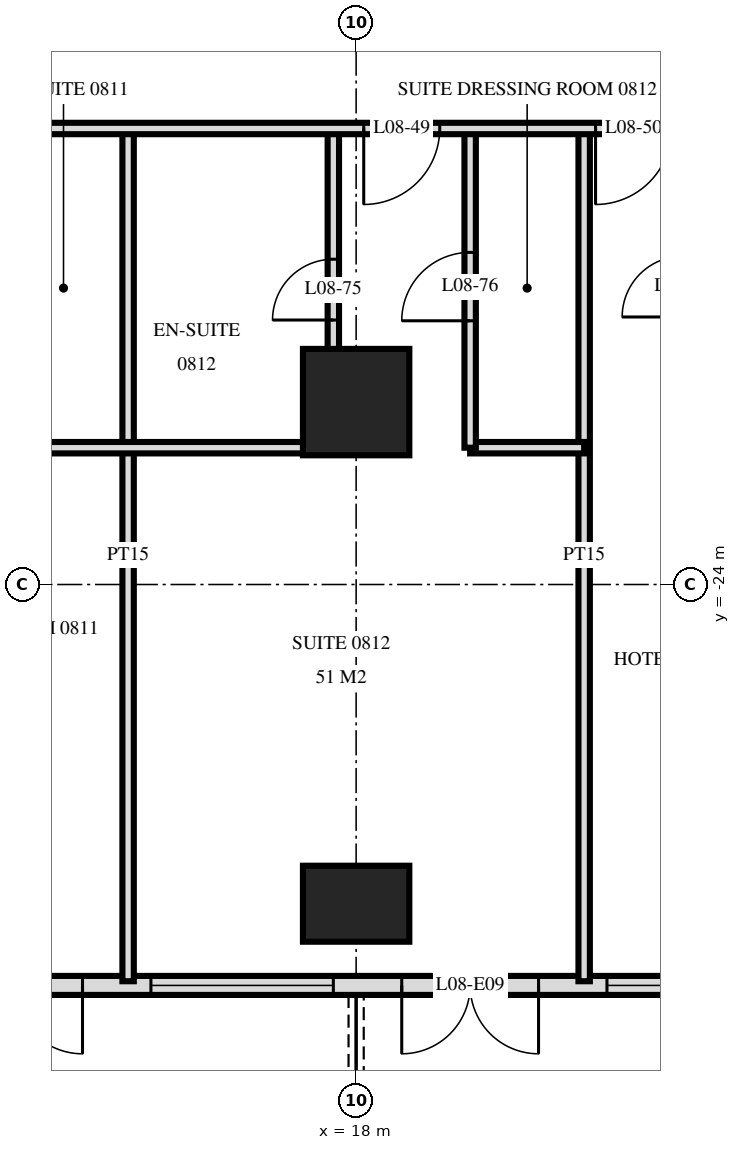
"""IFC4 building model, lengths in metres.
Left out: names, types, materials, properties, quantities, classifications, styles, units other than length and angle.
Written with IfcOpenShell. Run it as: python <this file> out.ifc"""

import sys

from ifc_helpers import new_model, si_unit, direction, frame, frame_2d, origin, origin_2d, place, context, subcontext, project, spatial, rectangle, extrude, element, fill, save


model = new_model("IFC4")
c1 = context("Model", 3, precision=1e-05, world=origin(), true_north=direction((0.0, 1.0)))
c2 = subcontext(c1, "Body", "Model", "MODEL_VIEW")
j1 = project(units=[si_unit("LENGTHUNIT", "METRE"), si_unit("PLANEANGLEUNIT", "RADIAN")], contexts=[c1])
p1 = place(None, origin())
s1 = spatial("IfcSite", under=j1, at=p1, CompositionType="ELEMENT")
p2 = place(p1, origin())
s2 = spatial("IfcBuilding", under=s1, at=p2, CompositionType="ELEMENT")
p3 = place(p2, frame((0.0, 0.0, 38.4)))
s3 = spatial("IfcBuildingStorey", under=s2, at=p3, CompositionType="ELEMENT", Elevation=38.4)
p4 = place(p3, frame((18.0, -28.2, 0.0), z_axis=(0.0, 0.0, 1.0), x_axis=(1.0, 0.0, 0.0)))
e1 = element("IfcColumn", 1, at=p4, inside=s3, PredefinedType="COLUMN", context=c2, shape_type="SweptSolid", body=[
    extrude(rectangle(XDim=1.4, YDim=1.0, at=origin_2d()), origin(), (0.0, 0.0, 1.0), 3.6),
])
p5 = place(p3, frame((18.0, -21.6, 0.0), z_axis=(0.0, 0.0, 1.0), x_axis=(1.0, 0.0, 0.0)))
e2 = element("IfcColumn", 2, at=p5, inside=s3, PredefinedType="COLUMN", context=c2, shape_type="SweptSolid", body=[
    extrude(rectangle(XDim=1.4, YDim=1.4, at=origin_2d()), origin(), (0.0, 0.0, 1.0), 3.6),
])
p6 = place(p3, frame((-28.775, -29.275, 0.0), z_axis=(0.0, 0.0, 1.0), x_axis=(1.0, 0.0, 0.0)))
e3 = element("IfcWall", 3, at=p6, inside=s3, PredefinedType="SOLIDWALL", context=c2, shape_type="SweptSolid", body=[
    extrude(rectangle(XDim=57.551, YDim=0.25, at=frame_2d((28.775, 0.0))), origin(), (0.0, 0.0, 1.0), 3.32),
])
p7 = place(p6, frame((0.575, 0.0, 0.0)))
e4 = element("IfcOpeningElement", 4, at=p7, cuts=e3, PredefinedType="OPENING", context=c2, shape_type="SweptSolid", body=[
    extrude(rectangle(XDim=1.8, YDim=2.4, at=frame_2d((0.9, 1.2))), frame((0.0, 0.135, 0.0), z_axis=(0.0, -1.0, 0.0), x_axis=(1.0, 0.0, 0.0)), (0.0, 0.0, 1.0), 0.27),
])
p8 = place(p6, frame((5.375, 0.0, 0.0)))
e5 = element("IfcOpeningElement", 5, at=p8, cuts=e3, PredefinedType="OPENING", context=c2, shape_type="SweptSolid", body=[
    extrude(rectangle(XDim=1.8, YDim=2.4, at=frame_2d((0.9, 1.2))), frame((0.0, 0.135, 0.0), z_axis=(0.0, -1.0, 0.0), x_axis=(1.0, 0.0, 0.0)), (0.0, 0.0, 1.0), 0.27),
])
p9 = place(p6, frame((8.075, 0.0, 0.3)))
e6 = element("IfcOpeningElement", 6, at=p9, cuts=e3, PredefinedType="OPENING", context=c2, shape_type="SweptSolid", body=[
    extrude(rectangle(XDim=2.4, YDim=2.1, at=frame_2d((1.2, 1.05))), frame((0.0, 0.135, 0.0), z_axis=(0.0, -1.0, 0.0), x_axis=(1.0, 0.0, 0.0)), (0.0, 0.0, 1.0), 0.27),
])
p10 = place(p6, frame((11.375, 0.0, 0.0)))
e7 = element("IfcOpeningElement", 7, at=p10, cuts=e3, PredefinedType="OPENING", context=c2, shape_type="SweptSolid", body=[
    extrude(rectangle(XDim=1.8, YDim=2.4, at=frame_2d((0.9, 1.2))), frame((0.0, 0.135, 0.0), z_axis=(0.0, -1.0, 0.0), x_axis=(1.0, 0.0, 0.0)), (0.0, 0.0, 1.0), 0.27),
])
p11 = place(p6, frame((14.075, 0.0, 0.3)))
e8 = element("IfcOpeningElement", 8, at=p11, cuts=e3, PredefinedType="OPENING", context=c2, shape_type="SweptSolid", body=[
    extrude(rectangle(XDim=2.4, YDim=2.1, at=frame_2d((1.2, 1.05))), frame((0.0, 0.135, 0.0), z_axis=(0.0, -1.0, 0.0), x_axis=(1.0, 0.0, 0.0)), (0.0, 0.0, 1.0), 0.27),
])
p12 = place(p6, frame((17.375, 0.0, 0.0)))
e9 = element("IfcOpeningElement", 9, at=p12, cuts=e3, PredefinedType="OPENING", context=c2, shape_type="SweptSolid", body=[
    extrude(rectangle(XDim=1.8, YDim=2.4, at=frame_2d((0.9, 1.2))), frame((0.0, 0.135, 0.0), z_axis=(0.0, -1.0, 0.0), x_axis=(1.0, 0.0, 0.0)), (0.0, 0.0, 1.0), 0.27),
])
p13 = place(p6, frame((20.075, 0.0, 0.3)))
e10 = element("IfcOpeningElement", 10, at=p13, cuts=e3, PredefinedType="OPENING", context=c2, shape_type="SweptSolid", body=[
    extrude(rectangle(XDim=2.4, YDim=2.1, at=frame_2d((1.2, 1.05))), frame((0.0, 0.135, 0.0), z_axis=(0.0, -1.0, 0.0), x_axis=(1.0, 0.0, 0.0)), (0.0, 0.0, 1.0), 0.27),
])
p14 = place(p6, frame((23.075, 0.0, 0.3)))
e11 = element("IfcOpeningElement", 11, at=p14, cuts=e3, PredefinedType="OPENING", context=c2, shape_type="SweptSolid", body=[
    extrude(rectangle(XDim=2.4, YDim=2.1, at=frame_2d((1.2, 1.05))), frame((0.0, 0.135, 0.0), z_axis=(0.0, -1.0, 0.0), x_axis=(1.0, 0.0, 0.0)), (0.0, 0.0, 1.0), 0.27),
])
p15 = place(p6, frame((26.375, 0.0, 0.0)))
e12 = element("IfcOpeningElement", 12, at=p15, cuts=e3, PredefinedType="OPENING", context=c2, shape_type="SweptSolid", body=[
    extrude(rectangle(XDim=1.8, YDim=2.4, at=frame_2d((0.9, 1.2))), frame((0.0, 0.135, 0.0), z_axis=(0.0, -1.0, 0.0), x_axis=(1.0, 0.0, 0.0)), (0.0, 0.0, 1.0), 0.27),
])
p16 = place(p6, frame((29.375, 0.0, 0.0)))
e13 = element("IfcOpeningElement", 13, at=p16, cuts=e3, PredefinedType="OPENING", context=c2, shape_type="SweptSolid", body=[
    extrude(rectangle(XDim=1.8, YDim=2.4, at=frame_2d((0.9, 1.2))), frame((0.0, 0.135, 0.0), z_axis=(0.0, -1.0, 0.0), x_axis=(1.0, 0.0, 0.0)), (0.0, 0.0, 1.0), 0.27),
])
p17 = place(p6, frame((32.075, 0.0, 0.3)))
e14 = element("IfcOpeningElement", 14, at=p17, cuts=e3, PredefinedType="OPENING", context=c2, shape_type="SweptSolid", body=[
    extrude(rectangle(XDim=2.4, YDim=2.1, at=frame_2d((1.2, 1.05))), frame((0.0, 0.135, 0.0), z_axis=(0.0, -1.0, 0.0), x_axis=(1.0, 0.0, 0.0)), (0.0, 0.0, 1.0), 0.27),
])
p18 = place(p6, frame((35.375, 0.0, 0.0)))
e15 = element("IfcOpeningElement", 15, at=p18, cuts=e3, PredefinedType="OPENING", context=c2, shape_type="SweptSolid", body=[
    extrude(rectangle(XDim=1.8, YDim=2.4, at=frame_2d((0.9, 1.2))), frame((0.0, 0.135, 0.0), z_axis=(0.0, -1.0, 0.0), x_axis=(1.0, 0.0, 0.0)), (0.0, 0.0, 1.0), 0.27),
])
p19 = place(p6, frame((38.075, 0.0, 0.3)))
e16 = element("IfcOpeningElement", 16, at=p19, cuts=e3, PredefinedType="OPENING", context=c2, shape_type="SweptSolid", body=[
    extrude(rectangle(XDim=2.4, YDim=2.1, at=frame_2d((1.2, 1.05))), frame((0.0, 0.135, 0.0), z_axis=(0.0, -1.0, 0.0), x_axis=(1.0, 0.0, 0.0)), (0.0, 0.0, 1.0), 0.27),
])
p20 = place(p6, frame((41.375, 0.0, 0.0)))
e17 = element("IfcOpeningElement", 17, at=p20, cuts=e3, PredefinedType="OPENING", context=c2, shape_type="SweptSolid", body=[
    extrude(rectangle(XDim=1.8, YDim=2.4, at=frame_2d((0.9, 1.2))), frame((0.0, 0.135, 0.0), z_axis=(0.0, -1.0, 0.0), x_axis=(1.0, 0.0, 0.0)), (0.0, 0.0, 1.0), 0.27),
])
p21 = place(p6, frame((44.075, 0.0, 0.3)))
e18 = element("IfcOpeningElement", 18, at=p21, cuts=e3, PredefinedType="OPENING", context=c2, shape_type="SweptSolid", body=[
    extrude(rectangle(XDim=2.4, YDim=2.1, at=frame_2d((1.2, 1.05))), frame((0.0, 0.135, 0.0), z_axis=(0.0, -1.0, 0.0), x_axis=(1.0, 0.0, 0.0)), (0.0, 0.0, 1.0), 0.27),
])
p22 = place(p6, frame((47.375, 0.0, 0.0)))
e19 = element("IfcOpeningElement", 19, at=p22, cuts=e3, PredefinedType="OPENING", context=c2, shape_type="SweptSolid", body=[
    extrude(rectangle(XDim=1.8, YDim=2.4, at=frame_2d((0.9, 1.2))), frame((0.0, 0.135, 0.0), z_axis=(0.0, -1.0, 0.0), x_axis=(1.0, 0.0, 0.0)), (0.0, 0.0, 1.0), 0.27),
])
p23 = place(p6, frame((50.075, 0.0, 0.3)))
e20 = element("IfcOpeningElement", 20, at=p23, cuts=e3, PredefinedType="OPENING", context=c2, shape_type="SweptSolid", body=[
    extrude(rectangle(XDim=2.4, YDim=2.1, at=frame_2d((1.2, 1.05))), frame((0.0, 0.135, 0.0), z_axis=(0.0, -1.0, 0.0), x_axis=(1.0, 0.0, 0.0)), (0.0, 0.0, 1.0), 0.27),
])
p24 = place(p6, frame((53.375, 0.0, 0.0)))
e21 = element("IfcOpeningElement", 21, at=p24, cuts=e3, PredefinedType="OPENING", context=c2, shape_type="SweptSolid", body=[
    extrude(rectangle(XDim=1.8, YDim=2.4, at=frame_2d((0.9, 1.2))), frame((0.0, 0.135, 0.0), z_axis=(0.0, -1.0, 0.0), x_axis=(1.0, 0.0, 0.0)), (0.0, 0.0, 1.0), 0.27),
])
p25 = place(p3, frame((21.0, -29.22, 0.0), z_axis=(0.0, 0.0, 1.0), x_axis=(0.0, 1.0, 0.0)))
e22 = element("IfcWall", 22, at=p25, inside=s3, PredefinedType="PARTITIONING", context=c2, shape_type="SweptSolid", body=[
    extrude(rectangle(XDim=11.22, YDim=0.15, at=frame_2d((5.61, 0.0))), origin(), (0.0, 0.0, 1.0), 3.32),
])
p26 = place(p3, frame((19.5, -22.2, 0.0), z_axis=(0.0, 0.0, 1.0), x_axis=(0.0, 1.0, 0.0)))
e23 = element("IfcWall", 23, at=p26, inside=s3, PredefinedType="PARTITIONING", context=c2, shape_type="SweptSolid", body=[
    extrude(rectangle(XDim=4.2, YDim=0.15, at=frame_2d((2.1, 0.0))), origin(), (0.0, 0.0, 1.0), 3.32),
])
p27 = place(p26, frame((1.67, 0.0, 0.0)))
e24 = element("IfcOpeningElement", 24, at=p27, cuts=e23, PredefinedType="OPENING", context=c2, shape_type="SweptSolid", body=[
    extrude(rectangle(XDim=0.9, YDim=2.1, at=frame_2d((0.45, 1.05))), frame((0.0, 0.085, 0.0), z_axis=(0.0, -1.0, 0.0), x_axis=(1.0, 0.0, 0.0)), (0.0, 0.0, 1.0), 0.17),
])
p28 = place(p3, frame((17.7, -22.2, 0.0), z_axis=(0.0, 0.0, 1.0), x_axis=(0.0, 1.0, 0.0)))
e25 = element("IfcWall", 25, at=p28, inside=s3, PredefinedType="PARTITIONING", context=c2, shape_type="SweptSolid", body=[
    extrude(rectangle(XDim=4.2, YDim=0.15, at=frame_2d((2.1, 0.0))), origin(), (0.0, 0.0, 1.0), 3.32),
])
p29 = place(p28, frame((1.68, 0.0, 0.0)))
e26 = element("IfcOpeningElement", 26, at=p29, cuts=e25, PredefinedType="OPENING", context=c2, shape_type="SweptSolid", body=[
    extrude(rectangle(XDim=0.8, YDim=2.1, at=frame_2d((0.4, 1.05))), frame((0.0, 0.085, 0.0), z_axis=(0.0, -1.0, 0.0), x_axis=(1.0, 0.0, 0.0)), (0.0, 0.0, 1.0), 0.17),
])
p30 = place(p3, frame((15.0, -29.22, 0.0), z_axis=(0.0, 0.0, 1.0), x_axis=(0.0, 1.0, 0.0)))
e27 = element("IfcWall", 27, at=p30, inside=s3, PredefinedType="PARTITIONING", context=c2, shape_type="SweptSolid", body=[
    extrude(rectangle(XDim=11.22, YDim=0.15, at=frame_2d((5.61, 0.0))), origin(), (0.0, 0.0, 1.0), 3.32),
])
p31 = place(p3, frame((13.3, -22.2, 0.0), z_axis=(0.0, 0.0, 1.0), x_axis=(1.0, 0.0, 0.0)))
e28 = element("IfcWall", 28, at=p31, inside=s3, PredefinedType="PARTITIONING", context=c2, shape_type="SweptSolid", body=[
    extrude(rectangle(XDim=4.4, YDim=0.15, at=frame_2d((2.2, 0.0))), origin(), (0.0, 0.0, 1.0), 3.32),
])
p32 = place(p3, frame((19.5, -22.2, 0.0), z_axis=(0.0, 0.0, 1.0), x_axis=(1.0, 0.0, 0.0)))
e29 = element("IfcWall", 29, at=p32, inside=s3, PredefinedType="PARTITIONING", context=c2, shape_type="SweptSolid", body=[
    extrude(rectangle(XDim=1.5, YDim=0.15, at=frame_2d((0.75, 0.0))), origin(), (0.0, 0.0, 1.0), 3.32),
])
p33 = place(p3, frame((-33.12, -18.0, 0.0), z_axis=(0.0, 0.0, 1.0), x_axis=(1.0, 0.0, 0.0)))
e30 = element("IfcWall", 30, at=p33, inside=s3, PredefinedType="PARTITIONING", context=c2, shape_type="SweptSolid", body=[
    extrude(rectangle(XDim=66.24, YDim=0.15, at=frame_2d((33.12, 0.0))), origin(), (0.0, 0.0, 1.0), 3.32),
])
p34 = place(p33, frame((12.27, 0.0, 0.0)))
e31 = element("IfcOpeningElement", 31, at=p34, cuts=e30, PredefinedType="OPENING", context=c2, shape_type="SweptSolid", body=[
    extrude(rectangle(XDim=1.0, YDim=2.1, at=frame_2d((0.5, 1.05))), frame((0.0, 0.085, 0.0), z_axis=(0.0, -1.0, 0.0), x_axis=(1.0, 0.0, 0.0)), (0.0, 0.0, 1.0), 0.17),
])
p35 = place(p33, frame((16.97, 0.0, 0.0)))
e32 = element("IfcOpeningElement", 32, at=p35, cuts=e30, PredefinedType="OPENING", context=c2, shape_type="SweptSolid", body=[
    extrude(rectangle(XDim=1.0, YDim=2.1, at=frame_2d((0.5, 1.05))), frame((0.0, 0.085, 0.0), z_axis=(0.0, -1.0, 0.0), x_axis=(1.0, 0.0, 0.0)), (0.0, 0.0, 1.0), 0.17),
])
p36 = place(p33, frame((18.27, 0.0, 0.0)))
e33 = element("IfcOpeningElement", 33, at=p36, cuts=e30, PredefinedType="OPENING", context=c2, shape_type="SweptSolid", body=[
    extrude(rectangle(XDim=1.0, YDim=2.1, at=frame_2d((0.5, 1.05))), frame((0.0, 0.085, 0.0), z_axis=(0.0, -1.0, 0.0), x_axis=(1.0, 0.0, 0.0)), (0.0, 0.0, 1.0), 0.17),
])
p37 = place(p33, frame((22.97, 0.0, 0.0)))
e34 = element("IfcOpeningElement", 34, at=p37, cuts=e30, PredefinedType="OPENING", context=c2, shape_type="SweptSolid", body=[
    extrude(rectangle(XDim=1.0, YDim=2.1, at=frame_2d((0.5, 1.05))), frame((0.0, 0.085, 0.0), z_axis=(0.0, -1.0, 0.0), x_axis=(1.0, 0.0, 0.0)), (0.0, 0.0, 1.0), 0.17),
])
p38 = place(p33, frame((24.27, 0.0, 0.0)))
e35 = element("IfcOpeningElement", 35, at=p38, cuts=e30, PredefinedType="OPENING", context=c2, shape_type="SweptSolid", body=[
    extrude(rectangle(XDim=1.0, YDim=2.1, at=frame_2d((0.5, 1.05))), frame((0.0, 0.085, 0.0), z_axis=(0.0, -1.0, 0.0), x_axis=(1.0, 0.0, 0.0)), (0.0, 0.0, 1.0), 0.17),
])
p39 = place(p33, frame((28.97, 0.0, 0.0)))
e36 = element("IfcOpeningElement", 36, at=p39, cuts=e30, PredefinedType="OPENING", context=c2, shape_type="SweptSolid", body=[
    extrude(rectangle(XDim=1.0, YDim=2.1, at=frame_2d((0.5, 1.05))), frame((0.0, 0.085, 0.0), z_axis=(0.0, -1.0, 0.0), x_axis=(1.0, 0.0, 0.0)), (0.0, 0.0, 1.0), 0.17),
])
p40 = place(p33, frame((30.27, 0.0, 0.0)))
e37 = element("IfcOpeningElement", 37, at=p40, cuts=e30, PredefinedType="OPENING", context=c2, shape_type="SweptSolid", body=[
    extrude(rectangle(XDim=1.0, YDim=2.1, at=frame_2d((0.5, 1.05))), frame((0.0, 0.085, 0.0), z_axis=(0.0, -1.0, 0.0), x_axis=(1.0, 0.0, 0.0)), (0.0, 0.0, 1.0), 0.17),
])
p41 = place(p33, frame((34.97, 0.0, 0.0)))
e38 = element("IfcOpeningElement", 38, at=p41, cuts=e30, PredefinedType="OPENING", context=c2, shape_type="SweptSolid", body=[
    extrude(rectangle(XDim=1.0, YDim=2.1, at=frame_2d((0.5, 1.05))), frame((0.0, 0.085, 0.0), z_axis=(0.0, -1.0, 0.0), x_axis=(1.0, 0.0, 0.0)), (0.0, 0.0, 1.0), 0.17),
])
p42 = place(p33, frame((37.27, 0.0, 0.0)))
e39 = element("IfcOpeningElement", 39, at=p42, cuts=e30, PredefinedType="OPENING", context=c2, shape_type="SweptSolid", body=[
    extrude(rectangle(XDim=1.0, YDim=2.1, at=frame_2d((0.5, 1.05))), frame((0.0, 0.085, 0.0), z_axis=(0.0, -1.0, 0.0), x_axis=(1.0, 0.0, 0.0)), (0.0, 0.0, 1.0), 0.17),
])
p43 = place(p33, frame((43.97, 0.0, 0.0)))
e40 = element("IfcOpeningElement", 40, at=p43, cuts=e30, PredefinedType="OPENING", context=c2, shape_type="SweptSolid", body=[
    extrude(rectangle(XDim=1.0, YDim=2.1, at=frame_2d((0.5, 1.05))), frame((0.0, 0.085, 0.0), z_axis=(0.0, -1.0, 0.0), x_axis=(1.0, 0.0, 0.0)), (0.0, 0.0, 1.0), 0.17),
])
p44 = place(p33, frame((45.27, 0.0, 0.0)))
e41 = element("IfcOpeningElement", 41, at=p44, cuts=e30, PredefinedType="OPENING", context=c2, shape_type="SweptSolid", body=[
    extrude(rectangle(XDim=1.0, YDim=2.1, at=frame_2d((0.5, 1.05))), frame((0.0, 0.085, 0.0), z_axis=(0.0, -1.0, 0.0), x_axis=(1.0, 0.0, 0.0)), (0.0, 0.0, 1.0), 0.17),
])
p45 = place(p33, frame((51.22, 0.0, 0.0)))
e42 = element("IfcOpeningElement", 42, at=p45, cuts=e30, PredefinedType="OPENING", context=c2, shape_type="SweptSolid", body=[
    extrude(rectangle(XDim=1.0, YDim=2.1, at=frame_2d((0.5, 1.05))), frame((0.0, 0.085, 0.0), z_axis=(0.0, -1.0, 0.0), x_axis=(1.0, 0.0, 0.0)), (0.0, 0.0, 1.0), 0.17),
])
p46 = place(p33, frame((54.27, 0.0, 0.0)))
e43 = element("IfcOpeningElement", 43, at=p46, cuts=e30, PredefinedType="OPENING", context=c2, shape_type="SweptSolid", body=[
    extrude(rectangle(XDim=1.0, YDim=2.1, at=frame_2d((0.5, 1.05))), frame((0.0, 0.085, 0.0), z_axis=(0.0, -1.0, 0.0), x_axis=(1.0, 0.0, 0.0)), (0.0, 0.0, 1.0), 0.17),
])
p47 = place(p33, frame((6.07, 0.0, 0.0)))
e44 = element("IfcOpeningElement", 44, at=p47, cuts=e30, PredefinedType="OPENING", context=c2, shape_type="SweptSolid", body=[
    extrude(rectangle(XDim=1.0, YDim=2.1, at=frame_2d((0.5, 1.05))), frame((0.0, 0.085, 0.0), z_axis=(0.0, -1.0, 0.0), x_axis=(1.0, 0.0, 0.0)), (0.0, 0.0, 1.0), 0.17),
])
p48 = place(p33, frame((63.37, 0.0, 0.0)))
e45 = element("IfcOpeningElement", 45, at=p48, cuts=e30, PredefinedType="OPENING", context=c2, shape_type="SweptSolid", body=[
    extrude(rectangle(XDim=1.0, YDim=2.1, at=frame_2d((0.5, 1.05))), frame((0.0, 0.085, 0.0), z_axis=(0.0, -1.0, 0.0), x_axis=(1.0, 0.0, 0.0)), (0.0, 0.0, 1.0), 0.17),
])
p49 = place(p20, frame((0.9, 0.0, 0.0), z_axis=(0.0, 0.0, 1.0), x_axis=(-1.0, 0.0, 0.0)))
e46 = element("IfcDoor", 46, at=p49, inside=s3, OperationType="DOUBLE_DOOR_SINGLE_SWING", PredefinedType="DOOR", context=c2, shape_type="SweptSolid", body=[
    extrude(rectangle(XDim=1.8, YDim=2.4, at=frame_2d((0.0, 1.2))), frame((0.0, -0.025, 0.0), z_axis=(0.0, 1.0, 0.0), x_axis=(-1.0, 0.0, 0.0)), (0.0, 0.0, 1.0), 0.05),
])
fill(e17, e46)
p50 = place(p21, origin())
e47 = element("IfcWindow", 47, at=p50, inside=s3, PartitioningType="SINGLE_PANEL", PredefinedType="WINDOW", context=c2, shape_type="SweptSolid", body=[
    extrude(rectangle(XDim=2.4, YDim=2.1, at=frame_2d((1.2, 1.05))), frame((0.0, 0.03, 0.0), z_axis=(0.0, -1.0, 0.0), x_axis=(1.0, 0.0, 0.0)), (0.0, 0.0, 1.0), 0.06),
])
fill(e18, e47)
p51 = place(p22, frame((0.9, 0.0, 0.0), z_axis=(0.0, 0.0, 1.0), x_axis=(-1.0, 0.0, 0.0)))
e48 = element("IfcDoor", 48, at=p51, inside=s3, OperationType="DOUBLE_DOOR_SINGLE_SWING", PredefinedType="DOOR", context=c2, shape_type="SweptSolid", body=[
    extrude(rectangle(XDim=1.8, YDim=2.4, at=frame_2d((0.0, 1.2))), frame((0.0, -0.025, 0.0), z_axis=(0.0, 1.0, 0.0), x_axis=(-1.0, 0.0, 0.0)), (0.0, 0.0, 1.0), 0.05),
])
fill(e19, e48)
p52 = place(p23, origin())
e49 = element("IfcWindow", 49, at=p52, inside=s3, PartitioningType="SINGLE_PANEL", PredefinedType="WINDOW", context=c2, shape_type="SweptSolid", body=[
    extrude(rectangle(XDim=2.4, YDim=2.1, at=frame_2d((1.2, 1.05))), frame((0.0, 0.03, 0.0), z_axis=(0.0, -1.0, 0.0), x_axis=(1.0, 0.0, 0.0)), (0.0, 0.0, 1.0), 0.06),
])
fill(e20, e49)
p53 = place(p45, frame((0.5, 0.0, 0.0), z_axis=(0.0, 0.0, 1.0), x_axis=(-1.0, 0.0, 0.0)))
e50 = element("IfcDoor", 50, at=p53, inside=s3, OperationType="SINGLE_SWING_LEFT", PredefinedType="DOOR", context=c2, shape_type="SweptSolid", body=[
    extrude(rectangle(XDim=1.0, YDim=2.1, at=frame_2d((0.0, 1.05))), frame((0.0, -0.025, 0.0), z_axis=(0.0, 1.0, 0.0), x_axis=(-1.0, 0.0, 0.0)), (0.0, 0.0, 1.0), 0.05),
])
fill(e42, e50)
p54 = place(p46, frame((0.5, 0.0, 0.0), z_axis=(0.0, 0.0, 1.0), x_axis=(-1.0, 0.0, 0.0)))
e51 = element("IfcDoor", 51, at=p54, inside=s3, OperationType="SINGLE_SWING_LEFT", PredefinedType="DOOR", context=c2, shape_type="SweptSolid", body=[
    extrude(rectangle(XDim=1.0, YDim=2.1, at=frame_2d((0.0, 1.05))), frame((0.0, -0.025, 0.0), z_axis=(0.0, 1.0, 0.0), x_axis=(-1.0, 0.0, 0.0)), (0.0, 0.0, 1.0), 0.05),
])
fill(e43, e51)
p55 = place(p29, origin())
e52 = element("IfcDoor", 52, at=p55, inside=s3, OperationType="SINGLE_SWING_RIGHT", PredefinedType="DOOR", context=c2, shape_type="SweptSolid", body=[
    extrude(rectangle(XDim=0.8, YDim=2.1, at=frame_2d((0.4, 1.05))), frame((0.0, 0.025, 0.0), z_axis=(0.0, -1.0, 0.0), x_axis=(1.0, 0.0, 0.0)), (0.0, 0.0, 1.0), 0.05),
])
fill(e26, e52)
p56 = place(p27, origin())
e53 = element("IfcDoor", 53, at=p56, inside=s3, OperationType="SINGLE_SWING_RIGHT", PredefinedType="DOOR", context=c2, shape_type="SweptSolid", body=[
    extrude(rectangle(XDim=0.9, YDim=2.1, at=frame_2d((0.45, 1.05))), frame((0.0, 0.025, 0.0), z_axis=(0.0, -1.0, 0.0), x_axis=(1.0, 0.0, 0.0)), (0.0, 0.0, 1.0), 0.05),
])
fill(e24, e53)
save(model, sys.argv[1])
